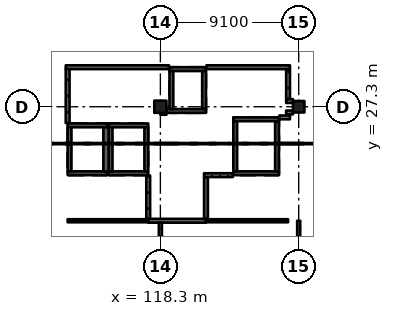
"""IFC4 building model, lengths in metres.
Left out: names, types, materials, properties, quantities, classifications, styles, units other than length and angle.
Written with IfcOpenShell. Run it as: python <this file> out.ifc"""

import sys

from ifc_helpers import new_model, si_unit, direction, frame, frame_2d, origin, origin_2d, place, context, subcontext, project, spatial, rectangle, extrude, element, fill, save


model = new_model("IFC4")
c1 = context("Model", 3, precision=1e-05, world=origin(), true_north=direction((0.0, 1.0)))
c2 = subcontext(c1, "Body", "Model", "MODEL_VIEW")
j1 = project(units=[si_unit("LENGTHUNIT", "METRE"), si_unit("PLANEANGLEUNIT", "RADIAN")], contexts=[c1])
p1 = place(None, origin())
s1 = spatial("IfcSite", under=j1, at=p1, CompositionType="ELEMENT")
p2 = place(p1, origin())
s2 = spatial("IfcBuilding", under=s1, at=p2, CompositionType="ELEMENT")
p3 = place(p2, frame((0.0, 0.0, 6.37)))
s3 = spatial("IfcBuildingStorey", under=s2, at=p3, CompositionType="ELEMENT", Elevation=6.37)
p4 = place(p3, frame((118.3, 27.3, 0.0), z_axis=(0.0, 0.0, 1.0), x_axis=(1.0, 0.0, 0.0)))
e1 = element("IfcColumn", 1, at=p4, inside=s3, PredefinedType="COLUMN", context=c2, shape_type="SweptSolid", body=[
    extrude(rectangle(XDim=0.8, YDim=0.8, at=origin_2d()), origin(), (0.0, 0.0, 1.0), 4.55),
])
p5 = place(p3, frame((127.4, 27.3, 0.0), z_axis=(0.0, 0.0, 1.0), x_axis=(1.0, 0.0, 0.0)))
e2 = element("IfcColumn", 2, at=p5, inside=s3, PredefinedType="COLUMN", context=c2, shape_type="SweptSolid", body=[
    extrude(rectangle(XDim=0.75, YDim=0.75, at=origin_2d()), origin(), (0.0, 0.0, 1.0), 4.55),
])
p6 = place(p3, frame((117.5, 22.925, 0.0), z_axis=(0.0, 0.0, 1.0), x_axis=(-1.0, 0.0, 0.0)))
e3 = element("IfcWall", 3, at=p6, inside=s3, PredefinedType="SHEAR", context=c2, shape_type="SweptSolid", body=[
    extrude(rectangle(XDim=2.6, YDim=0.25, at=frame_2d((1.3, 0.0))), origin(), (0.0, 0.0, 1.0), 4.55),
])
p7 = place(p6, frame((0.8, 0.0, 0.0)))
e4 = element("IfcOpeningElement", 4, at=p7, cuts=e3, PredefinedType="OPENING", context=c2, shape_type="SweptSolid", body=[
    extrude(rectangle(XDim=1.0, YDim=2.1, at=frame_2d((0.5, 1.05))), frame((0.0, 0.135, 0.0), z_axis=(0.0, -1.0, 0.0), x_axis=(1.0, 0.0, 0.0)), (0.0, 0.0, 1.0), 0.27),
])
p8 = place(p3, frame((117.5, 26.075, 0.0), z_axis=(0.0, 0.0, 1.0), x_axis=(-1.0, 0.0, 0.0)))
e5 = element("IfcWall", 5, at=p8, inside=s3, PredefinedType="SHEAR", context=c2, shape_type="SweptSolid", body=[
    extrude(rectangle(XDim=2.6, YDim=0.25, at=frame_2d((1.3, 0.0))), origin(), (0.0, 0.0, 1.0), 4.55),
])
for number, where, z_axis, x_axis in (
    (6, (115.025, 25.95, 0.0), (0.0, 0.0, 1.0), (0.0, -1.0, 0.0)),
    (7, (117.375, 25.95, 0.0), (0.0, 0.0, 1.0), (0.0, -1.0, 0.0)),
):
    element("IfcWall", number, at=place(p3, frame(where, z_axis=z_axis, x_axis=x_axis)), inside=s3, PredefinedType="SHEAR", context=c2, shape_type="SweptSolid", body=[
        extrude(rectangle(XDim=2.9, YDim=0.25, at=frame_2d((1.45, 0.0))), origin(), (0.0, 0.0, 1.0), 4.55),
    ])
p9 = place(p3, frame((114.8, 22.925, 0.0), z_axis=(0.0, 0.0, 1.0), x_axis=(-1.0, 0.0, 0.0)))
e8 = element("IfcWall", 8, at=p9, inside=s3, PredefinedType="SHEAR", context=c2, shape_type="SweptSolid", body=[
    extrude(rectangle(XDim=2.6, YDim=0.25, at=frame_2d((1.3, 0.0))), origin(), (0.0, 0.0, 1.0), 4.55),
])
p10 = place(p9, frame((0.8, 0.0, 0.0)))
e9 = element("IfcOpeningElement", 9, at=p10, cuts=e8, PredefinedType="OPENING", context=c2, shape_type="SweptSolid", body=[
    extrude(rectangle(XDim=1.0, YDim=2.1, at=frame_2d((0.5, 1.05))), frame((0.0, 0.135, 0.0), z_axis=(0.0, -1.0, 0.0), x_axis=(1.0, 0.0, 0.0)), (0.0, 0.0, 1.0), 0.27),
])
p11 = place(p3, frame((114.8, 26.075, 0.0), z_axis=(0.0, 0.0, 1.0), x_axis=(-1.0, 0.0, 0.0)))
e10 = element("IfcWall", 10, at=p11, inside=s3, PredefinedType="SHEAR", context=c2, shape_type="SweptSolid", body=[
    extrude(rectangle(XDim=2.6, YDim=0.25, at=frame_2d((1.3, 0.0))), origin(), (0.0, 0.0, 1.0), 4.55),
])
p12 = place(p3, frame((112.325, 25.95, 0.0), z_axis=(0.0, 0.0, 1.0), x_axis=(0.0, -1.0, 0.0)))
e11 = element("IfcWall", 11, at=p12, inside=s3, PredefinedType="SHEAR", context=c2, shape_type="SweptSolid", body=[
    extrude(rectangle(XDim=2.9, YDim=0.25, at=frame_2d((1.45, 0.0))), origin(), (0.0, 0.0, 1.0), 4.55),
])
p13 = place(p3, frame((114.725, 25.95, 0.0), z_axis=(0.0, 0.0, 1.0), x_axis=(0.0, -1.0, 0.0)))
e12 = element("IfcWall", 12, at=p13, inside=s3, PredefinedType="SHEAR", context=c2, shape_type="SweptSolid", body=[
    extrude(rectangle(XDim=2.9, YDim=0.35, at=frame_2d((1.45, 0.0))), origin(), (0.0, 0.0, 1.0), 4.55),
])
p14 = place(p3, frame((121.3, 27.025, 0.0), z_axis=(0.0, 0.0, 1.0), x_axis=(-1.0, 0.0, 0.0)))
e13 = element("IfcWall", 13, at=p14, inside=s3, PredefinedType="SHEAR", context=c2, shape_type="SweptSolid", body=[
    extrude(rectangle(XDim=2.6, YDim=0.25, at=frame_2d((1.3, 0.0))), origin(), (0.0, 0.0, 1.0), 4.55),
])
p15 = place(p3, frame((121.3, 29.775, 0.0), z_axis=(0.0, 0.0, 1.0), x_axis=(-1.0, 0.0, 0.0)))
e14 = element("IfcWall", 14, at=p15, inside=s3, PredefinedType="SHEAR", context=c2, shape_type="SweptSolid", body=[
    extrude(rectangle(XDim=2.4, YDim=0.25, at=frame_2d((1.2, 0.0))), origin(), (0.0, 0.0, 1.0), 4.55),
])
p16 = place(p3, frame((119.025, 29.65, 0.0), z_axis=(0.0, 0.0, 1.0), x_axis=(0.0, -1.0, 0.0)))
e15 = element("IfcWall", 15, at=p16, inside=s3, PredefinedType="SHEAR", context=c2, shape_type="SweptSolid", body=[
    extrude(rectangle(XDim=2.5, YDim=0.25, at=frame_2d((1.25, 0.0))), origin(), (0.0, 0.0, 1.0), 4.55),
])
p17 = place(p3, frame((121.175, 29.65, 0.0), z_axis=(0.0, 0.0, 1.0), x_axis=(0.0, -1.0, 0.0)))
e16 = element("IfcWall", 16, at=p17, inside=s3, PredefinedType="SHEAR", context=c2, shape_type="SweptSolid", body=[
    extrude(rectangle(XDim=2.5, YDim=0.25, at=frame_2d((1.25, 0.0))), origin(), (0.0, 0.0, 1.0), 4.55),
])
p18 = place(p17, frame((0.9, 0.0, 0.0)))
e17 = element("IfcOpeningElement", 17, at=p18, cuts=e16, PredefinedType="OPENING", context=c2, shape_type="SweptSolid", body=[
    extrude(rectangle(XDim=0.7, YDim=2.1, at=frame_2d((0.35, 1.05))), frame((0.0, 0.135, 0.0), z_axis=(0.0, -1.0, 0.0), x_axis=(1.0, 0.0, 0.0)), (0.0, 0.0, 1.0), 0.27),
])
p19 = place(p3, frame((126.1, 22.925, 0.0), z_axis=(0.0, 0.0, 1.0), x_axis=(-1.0, 0.0, 0.0)))
e18 = element("IfcWall", 18, at=p19, inside=s3, PredefinedType="SHEAR", context=c2, shape_type="SweptSolid", body=[
    extrude(rectangle(XDim=3.0, YDim=0.25, at=frame_2d((1.5, 0.0))), origin(), (0.0, 0.0, 1.0), 4.55),
])
p20 = place(p19, frame((0.95, 0.0, 0.0)))
e19 = element("IfcOpeningElement", 19, at=p20, cuts=e18, PredefinedType="OPENING", context=c2, shape_type="SweptSolid", body=[
    extrude(rectangle(XDim=1.1, YDim=2.1, at=frame_2d((0.55, 1.05))), frame((0.0, 0.135, 0.0), z_axis=(0.0, -1.0, 0.0), x_axis=(1.0, 0.0, 0.0)), (0.0, 0.0, 1.0), 0.27),
])
p21 = place(p3, frame((126.1, 26.475, 0.0), z_axis=(0.0, 0.0, 1.0), x_axis=(-1.0, 0.0, 0.0)))
e20 = element("IfcWall", 20, at=p21, inside=s3, PredefinedType="SHEAR", context=c2, shape_type="SweptSolid", body=[
    extrude(rectangle(XDim=3.0, YDim=0.25, at=frame_2d((1.5, 0.0))), origin(), (0.0, 0.0, 1.0), 4.55),
])
for number, where, z_axis, x_axis in (
    (21, (123.225, 26.35, 0.0), (0.0, 0.0, 1.0), (0.0, -1.0, 0.0)),
    (22, (125.975, 26.35, 0.0), (0.0, 0.0, 1.0), (0.0, -1.0, 0.0)),
):
    element("IfcWall", number, at=place(p3, frame(where, z_axis=z_axis, x_axis=x_axis)), inside=s3, PredefinedType="SHEAR", context=c2, shape_type="SweptSolid", body=[
        extrude(rectangle(XDim=3.3, YDim=0.25, at=frame_2d((1.65, 0.0))), origin(), (0.0, 0.0, 1.0), 4.55),
    ])
p22 = place(p3, frame((112.075, 29.9, 0.0), z_axis=(0.0, 0.0, 1.0), x_axis=(1.0, 0.0, 0.0)))
e23 = element("IfcWall", 23, at=p22, inside=s3, PredefinedType="SOLIDWALL", context=c2, shape_type="SweptSolid", body=[
    extrude(rectangle(XDim=6.795, YDim=0.25, at=frame_2d((3.397, 0.0))), origin(), (0.0, 0.0, 1.0), 4.25),
])
p23 = place(p3, frame((112.2, 19.8, 0.0), z_axis=(0.0, 0.0, 1.0), x_axis=(1.0, 0.0, 0.0)))
e24 = element("IfcWall", 24, at=p23, inside=s3, PredefinedType="PARTITIONING", context=c2, shape_type="SweptSolid", body=[
    extrude(rectangle(XDim=5.3, YDim=0.2, at=frame_2d((2.65, 0.0))), origin(), (0.0, 0.0, 1.0), 4.25),
])
p24 = place(p23, frame((1.75, 0.0, 0.0)))
e25 = element("IfcOpeningElement", 25, at=p24, cuts=e24, PredefinedType="OPENING", context=c2, shape_type="SweptSolid", body=[
    extrude(rectangle(XDim=1.8, YDim=2.4, at=frame_2d((0.9, 1.2))), frame((0.0, 0.11, 0.0), z_axis=(0.0, -1.0, 0.0), x_axis=(1.0, 0.0, 0.0)), (0.0, 0.0, 1.0), 0.22),
])
p25 = place(p3, frame((112.2, 26.23, 0.0), z_axis=(0.0, 0.0, 1.0), x_axis=(0.0, 1.0, 0.0)))
e26 = element("IfcWall", 26, at=p25, inside=s3, PredefinedType="SOLIDWALL", context=c2, shape_type="SweptSolid", body=[
    extrude(rectangle(XDim=3.545, YDim=0.25, at=frame_2d((1.772, 0.0))), origin(), (0.0, 0.0, 1.0), 4.25),
])
p26 = place(p3, frame((117.5, 19.8, 0.0), z_axis=(0.0, 0.0, 1.0), x_axis=(1.0, 0.0, 0.0)))
e27 = element("IfcWall", 27, at=p26, inside=s3, PredefinedType="SOLIDWALL", context=c2, shape_type="SweptSolid", body=[
    extrude(rectangle(XDim=3.8, YDim=0.25, at=frame_2d((1.9, 0.0))), origin(), (0.0, 0.0, 1.0), 4.25),
])
p27 = place(p26, frame((1.85, 0.0, 0.0)))
e28 = element("IfcOpeningElement", 28, at=p27, cuts=e27, PredefinedType="OPENING", context=c2, shape_type="SweptSolid", body=[
    extrude(rectangle(XDim=1.0, YDim=2.1, at=frame_2d((0.5, 1.05))), frame((0.0, 0.135, 0.0), z_axis=(0.0, -1.0, 0.0), x_axis=(1.0, 0.0, 0.0)), (0.0, 0.0, 1.0), 0.27),
])
p28 = place(p3, frame((117.5, 19.925, 0.0), z_axis=(0.0, 0.0, 1.0), x_axis=(0.0, 1.0, 0.0)))
e29 = element("IfcWall", 29, at=p28, inside=s3, PredefinedType="SOLIDWALL", context=c2, shape_type="SweptSolid", body=[
    extrude(rectangle(XDim=2.845, YDim=0.25, at=frame_2d((1.422, 0.0))), origin(), (0.0, 0.0, 1.0), 4.25),
])
p29 = place(p3, frame((118.3, 18.625, 0.0), z_axis=(0.0, 0.0, 1.0), x_axis=(0.0, 1.0, 0.0)))
e30 = element("IfcWall", 30, at=p29, inside=s3, PredefinedType="PARTITIONING", context=c2, shape_type="SweptSolid", body=[
    extrude(rectangle(XDim=1.05, YDim=0.2, at=frame_2d((0.525, 0.0))), origin(), (0.0, 0.0, 1.0), 3.55),
])
p30 = place(p3, frame((118.3, 26.9, 0.0), z_axis=(0.0, 0.0, 1.0), x_axis=(1.0, 0.0, 0.0)))
e31 = element("IfcWall", 31, at=p30, inside=s3, PredefinedType="SOLIDWALL", context=c2, shape_type="SweptSolid", body=[
    extrude(rectangle(XDim=0.4, YDim=0.25, at=frame_2d((0.2, 0.0))), origin(), (0.0, 0.0, 1.0), 4.25),
])
p31 = place(p3, frame((121.3, 19.8, 0.0), z_axis=(0.0, 0.0, 1.0), x_axis=(1.0, 0.0, 0.0)))
e32 = element("IfcWall", 32, at=p31, inside=s3, PredefinedType="PARTITIONING", context=c2, shape_type="SweptSolid", body=[
    extrude(rectangle(XDim=5.4, YDim=0.2, at=frame_2d((2.7, 0.0))), origin(), (0.0, 0.0, 1.0), 4.25),
])
p32 = place(p31, frame((1.85, 0.0, 0.0)))
e33 = element("IfcOpeningElement", 33, at=p32, cuts=e32, PredefinedType="OPENING", context=c2, shape_type="SweptSolid", body=[
    extrude(rectangle(XDim=1.8, YDim=2.4, at=frame_2d((0.9, 1.2))), frame((0.0, 0.11, 0.0), z_axis=(0.0, -1.0, 0.0), x_axis=(1.0, 0.0, 0.0)), (0.0, 0.0, 1.0), 0.22),
])
p33 = place(p3, frame((121.3, 22.675, 0.0), z_axis=(0.0, 0.0, 1.0), x_axis=(0.0, -1.0, 0.0)))
e34 = element("IfcWall", 34, at=p33, inside=s3, PredefinedType="SOLIDWALL", context=c2, shape_type="SweptSolid", body=[
    extrude(rectangle(XDim=2.75, YDim=0.25, at=frame_2d((1.375, 0.0))), origin(), (0.0, 0.0, 1.0), 4.25),
])
p34 = place(p3, frame((121.33, 29.9, 0.0), z_axis=(0.0, 0.0, 1.0), x_axis=(1.0, 0.0, 0.0)))
e35 = element("IfcWall", 35, at=p34, inside=s3, PredefinedType="SOLIDWALL", context=c2, shape_type="SweptSolid", body=[
    extrude(rectangle(XDim=5.495, YDim=0.25, at=frame_2d((2.748, 0.0))), origin(), (0.0, 0.0, 1.0), 4.25),
])
p35 = place(p3, frame((123.07, 22.8, 0.0), z_axis=(0.0, 0.0, 1.0), x_axis=(-1.0, 0.0, 0.0)))
e36 = element("IfcWall", 36, at=p35, inside=s3, PredefinedType="SOLIDWALL", context=c2, shape_type="SweptSolid", body=[
    extrude(rectangle(XDim=1.895, YDim=0.25, at=frame_2d((0.948, 0.0))), origin(), (0.0, 0.0, 1.0), 4.25),
])
p36 = place(p3, frame((126.575, 26.925, 0.0), z_axis=(0.0, 0.0, 1.0), x_axis=(1.0, 0.0, 0.0)))
e37 = element("IfcWall", 37, at=p36, inside=s3, PredefinedType="SOLIDWALL", context=c2, shape_type="SweptSolid", body=[
    extrude(rectangle(XDim=0.45, YDim=0.25, at=frame_2d((0.225, 0.0))), origin(), (0.0, 0.0, 1.0), 4.25),
])
p37 = place(p3, frame((126.7, 27.8, 0.0), z_axis=(0.0, 0.0, 1.0), x_axis=(0.0, 1.0, 0.0)))
e38 = element("IfcWall", 38, at=p37, inside=s3, PredefinedType="SOLIDWALL", context=c2, shape_type="SweptSolid", body=[
    extrude(rectangle(XDim=1.975, YDim=0.25, at=frame_2d((0.987, 0.0))), origin(), (0.0, 0.0, 1.0), 4.25),
])
p38 = place(p3, frame((126.825, 26.6, 0.0), z_axis=(0.0, 0.0, 1.0), x_axis=(-1.0, 0.0, 0.0)))
e39 = element("IfcWall", 39, at=p38, inside=s3, PredefinedType="SOLIDWALL", context=c2, shape_type="SweptSolid", body=[
    extrude(rectangle(XDim=0.695, YDim=0.25, at=frame_2d((0.348, 0.0))), origin(), (0.0, 0.0, 1.0), 4.25),
])
p39 = place(p3, frame((127.025, 27.675, 0.0), z_axis=(0.0, 0.0, 1.0), x_axis=(-1.0, 0.0, 0.0)))
e40 = element("IfcWall", 40, at=p39, inside=s3, PredefinedType="SOLIDWALL", context=c2, shape_type="SweptSolid", body=[
    extrude(rectangle(XDim=0.45, YDim=0.25, at=frame_2d((0.225, 0.0))), origin(), (0.0, 0.0, 1.0), 4.25),
])
p40 = place(p3, frame((127.4, 18.625, 0.0), z_axis=(0.0, 0.0, 1.0), x_axis=(0.0, 1.0, 0.0)))
e41 = element("IfcWall", 41, at=p40, inside=s3, PredefinedType="PARTITIONING", context=c2, shape_type="SweptSolid", body=[
    extrude(rectangle(XDim=1.175, YDim=0.2, at=frame_2d((0.587, 0.0))), origin(), (0.0, 0.0, 1.0), 3.55),
])
p41 = place(p27, origin())
e42 = element("IfcDoor", 42, at=p41, inside=s3, OperationType="SINGLE_SWING_LEFT", PredefinedType="DOOR", context=c2, shape_type="SweptSolid", body=[
    extrude(rectangle(XDim=1.0, YDim=2.1, at=frame_2d((0.5, 1.05))), frame((0.0, 0.025, 0.0), z_axis=(0.0, -1.0, 0.0), x_axis=(1.0, 0.0, 0.0)), (0.0, 0.0, 1.0), 0.05),
])
fill(e28, e42)
p42 = place(p32, origin())
e43 = element("IfcDoor", 43, at=p42, inside=s3, OperationType="DOUBLE_DOOR_SINGLE_SWING", PredefinedType="DOOR", context=c2, shape_type="SweptSolid", body=[
    extrude(rectangle(XDim=1.8, YDim=2.4, at=frame_2d((0.9, 1.2))), frame((0.0, 0.025, 0.0), z_axis=(0.0, -1.0, 0.0), x_axis=(1.0, 0.0, 0.0)), (0.0, 0.0, 1.0), 0.05),
])
fill(e33, e43)
p43 = place(p24, origin())
e44 = element("IfcDoor", 44, at=p43, inside=s3, OperationType="DOUBLE_DOOR_SINGLE_SWING", PredefinedType="DOOR", context=c2, shape_type="SweptSolid", body=[
    extrude(rectangle(XDim=1.8, YDim=2.4, at=frame_2d((0.9, 1.2))), frame((0.0, 0.025, 0.0), z_axis=(0.0, -1.0, 0.0), x_axis=(1.0, 0.0, 0.0)), (0.0, 0.0, 1.0), 0.05),
])
fill(e25, e44)
p44 = place(p18, origin())
e45 = element("IfcDoor", 45, at=p44, inside=s3, OperationType="SINGLE_SWING_RIGHT", PredefinedType="DOOR", context=c2, shape_type="SweptSolid", body=[
    extrude(rectangle(XDim=0.7, YDim=2.1, at=frame_2d((0.35, 1.05))), frame((0.0, 0.025, 0.0), z_axis=(0.0, -1.0, 0.0), x_axis=(1.0, 0.0, 0.0)), (0.0, 0.0, 1.0), 0.05),
])
fill(e17, e45)
p45 = place(p7, origin())
e46 = element("IfcDoor", 46, at=p45, inside=s3, OperationType="DOUBLE_DOOR_SLIDING", PredefinedType="DOOR", context=c2, shape_type="SweptSolid", body=[
    extrude(rectangle(XDim=1.0, YDim=2.1, at=frame_2d((0.5, 1.05))), frame((0.0, 0.025, 0.0), z_axis=(0.0, -1.0, 0.0), x_axis=(1.0, 0.0, 0.0)), (0.0, 0.0, 1.0), 0.05),
])
fill(e4, e46)
p46 = place(p10, origin())
e47 = element("IfcDoor", 47, at=p46, inside=s3, OperationType="DOUBLE_DOOR_SLIDING", PredefinedType="DOOR", context=c2, shape_type="SweptSolid", body=[
    extrude(rectangle(XDim=1.0, YDim=2.1, at=frame_2d((0.5, 1.05))), frame((0.0, 0.025, 0.0), z_axis=(0.0, -1.0, 0.0), x_axis=(1.0, 0.0, 0.0)), (0.0, 0.0, 1.0), 0.05),
])
fill(e9, e47)
p47 = place(p20, origin())
e48 = element("IfcDoor", 48, at=p47, inside=s3, OperationType="DOUBLE_DOOR_SLIDING", PredefinedType="DOOR", context=c2, shape_type="SweptSolid", body=[
    extrude(rectangle(XDim=1.1, YDim=2.1, at=frame_2d((0.55, 1.05))), frame((0.0, 0.025, 0.0), z_axis=(0.0, -1.0, 0.0), x_axis=(1.0, 0.0, 0.0)), (0.0, 0.0, 1.0), 0.05),
])
fill(e19, e48)
save(model, sys.argv[1])
